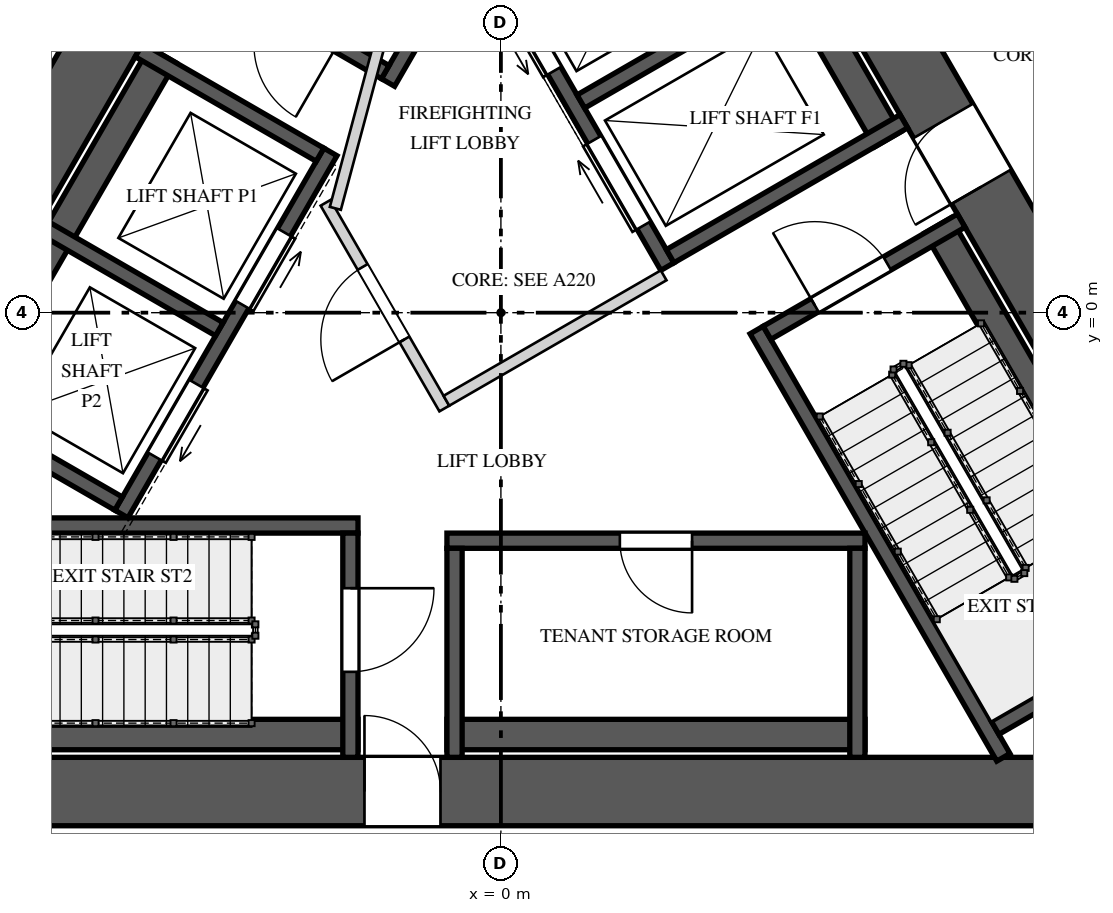
"""IFC4 building model, lengths in metres.
Left out: names, types, materials, properties, quantities, classifications, styles, units other than length and angle.
Written with IfcOpenShell. Run it as: python <this file> out.ifc"""

import sys

from ifc_helpers import new_model, si_unit, direction, frame, frame_2d, origin, place, context, subcontext, project, spatial, rectangle, extrude, element, fill, save


model = new_model("IFC4")
c1 = context("Model", 3, precision=1e-05, world=origin(), true_north=direction((0.0, 1.0)))
c2 = subcontext(c1, "Body", "Model", "MODEL_VIEW")
j1 = project(units=[si_unit("LENGTHUNIT", "METRE"), si_unit("PLANEANGLEUNIT", "RADIAN")], contexts=[c1])
p1 = place(None, origin())
s1 = spatial("IfcSite", under=j1, at=p1, CompositionType="ELEMENT")
p2 = place(p1, origin())
s2 = spatial("IfcBuilding", under=s1, at=p2, CompositionType="ELEMENT")
p3 = place(p2, frame((0.0, 0.0, 133.6)))
s3 = spatial("IfcBuildingStorey", under=s2, at=p3, CompositionType="ELEMENT", Elevation=133.6)
p4 = place(p3, frame((-1.184, 10.55, 0.0), z_axis=(0.0, 0.0, 1.0), x_axis=(-0.500004814304, -0.866022624227, 0.0)))
e1 = element("IfcWall", 1, at=p4, inside=s3, PredefinedType="SHEAR", context=c2, shape_type="SweptSolid", body=[
    extrude(rectangle(XDim=17.09, YDim=0.9, at=frame_2d((8.545, 0.0))), origin(), (0.0, 0.0, 1.0), 4.0),
])
p5 = place(p4, frame((6.75, 0.0, 0.0)))
e2 = element("IfcOpeningElement", 2, at=p5, cuts=e1, PredefinedType="OPENING", context=c2, shape_type="SweptSolid", body=[
    extrude(rectangle(XDim=1.0, YDim=2.4, at=frame_2d((0.5, 1.2))), frame((0.0, 0.46, 0.0), z_axis=(0.0, -1.0, 0.0), x_axis=(1.0, 0.0, 0.0)), (0.0, 0.0, 1.0), 0.92),
])
p6 = place(p4, frame((14.678, 0.0, 0.0)))
e3 = element("IfcOpeningElement", 3, at=p6, cuts=e1, PredefinedType="OPENING", context=c2, shape_type="SweptSolid", body=[
    extrude(rectangle(XDim=0.8, YDim=2.1, at=frame_2d((0.4, 1.05))), frame((0.0, 0.46, 0.0), z_axis=(0.0, -1.0, 0.0), x_axis=(1.0, 0.0, 0.0)), (0.0, 0.0, 1.0), 0.92),
])
p7 = place(p3, frame((-8.545, -6.3, 0.0), z_axis=(0.0, 0.0, 1.0), x_axis=(1.0, 0.0, 0.0)))
e4 = element("IfcWall", 4, at=p7, inside=s3, PredefinedType="SHEAR", context=c2, shape_type="SweptSolid", body=[
    extrude(rectangle(XDim=17.09, YDim=0.9, at=frame_2d((8.545, 0.0))), origin(), (0.0, 0.0, 1.0), 4.0),
])
p8 = place(p7, frame((6.75, 0.0, 0.0)))
e5 = element("IfcOpeningElement", 5, at=p8, cuts=e4, PredefinedType="OPENING", context=c2, shape_type="SweptSolid", body=[
    extrude(rectangle(XDim=1.0, YDim=2.4, at=frame_2d((0.5, 1.2))), frame((0.0, 0.46, 0.0), z_axis=(0.0, -1.0, 0.0), x_axis=(1.0, 0.0, 0.0)), (0.0, 0.0, 1.0), 0.92),
])
p9 = place(p3, frame((9.729, -4.25, 0.0), z_axis=(0.0, 0.0, 1.0), x_axis=(-0.500004814304, 0.866022624227, 0.0)))
e6 = element("IfcWall", 6, at=p9, inside=s3, PredefinedType="SHEAR", context=c2, shape_type="SweptSolid", body=[
    extrude(rectangle(XDim=17.09, YDim=0.9, at=frame_2d((8.545, 0.0))), origin(), (0.0, 0.0, 1.0), 4.0),
])
p10 = place(p9, frame((6.82, 0.0, 0.0)))
e7 = element("IfcOpeningElement", 7, at=p10, cuts=e6, PredefinedType="OPENING", context=c2, shape_type="SweptSolid", body=[
    extrude(rectangle(XDim=1.0, YDim=2.4, at=frame_2d((0.5, 1.2))), frame((0.0, 0.46, 0.0), z_axis=(0.0, -1.0, 0.0), x_axis=(1.0, 0.0, 0.0)), (0.0, 0.0, 1.0), 0.92),
])
p11 = place(p3, frame((1.761, 8.65, 0.0), z_axis=(0.0, 0.0, 1.0), x_axis=(-0.500010023241, -0.866019616786, 0.0)))
e8 = element("IfcWall", 8, at=p11, inside=s3, PredefinedType="SOLIDWALL", context=c2, shape_type="SweptSolid", body=[
    extrude(rectangle(XDim=6.491, YDim=0.2, at=frame_2d((3.246, 0.0))), origin(), (0.0, 0.0, 1.0), 3.65),
])
p12 = place(p3, frame((-1.521, 3.165, 0.0), z_axis=(0.0, 0.0, 1.0), x_axis=(-0.866039495442, 0.49997559174, 0.0)))
e9 = element("IfcWall", 9, at=p12, inside=s3, PredefinedType="SOLIDWALL", context=c2, shape_type="SweptSolid", body=[
    extrude(rectangle(XDim=2.95, YDim=0.2, at=frame_2d((1.475, 0.0))), origin(), (0.0, 0.0, 1.0), 3.65),
])
p13 = place(p12, frame((0.725, 0.0, 0.0)))
e10 = element("IfcOpeningElement", 10, at=p13, cuts=e9, PredefinedType="OPENING", context=c2, shape_type="SweptSolid", body=[
    extrude(rectangle(XDim=1.1, YDim=2.4, at=frame_2d((0.55, 1.2))), frame((0.0, 0.11, 0.0), z_axis=(0.0, -1.0, 0.0), x_axis=(1.0, 0.0, 0.0)), (0.0, 0.0, 1.0), 0.22),
])
p14 = place(p3, frame((-8.08, -5.55, 0.0), z_axis=(0.0, 0.0, 1.0), x_axis=(1.0, 0.0, 0.0)))
e11 = element("IfcWall", 11, at=p14, inside=s3, PredefinedType="SOLIDWALL", context=c2, shape_type="SweptSolid", body=[
    extrude(rectangle(XDim=6.2, YDim=0.4, at=frame_2d((3.1, 0.0))), origin(), (0.0, 0.0, 1.0), 3.65),
])
p15 = place(p3, frame((-8.372, -2.8, 0.0), z_axis=(0.0, 0.0, 1.0), x_axis=(1.0, 0.0, 0.0)))
e12 = element("IfcWall", 12, at=p15, inside=s3, PredefinedType="SOLIDWALL", context=c2, shape_type="SweptSolid", body=[
    extrude(rectangle(XDim=6.492, YDim=0.2, at=frame_2d((3.246, 0.0))), origin(), (0.0, 0.0, 1.0), 3.65),
])
p16 = place(p3, frame((-1.98, -2.9, 0.0), z_axis=(0.0, 0.0, 1.0), x_axis=(0.0, -1.0, 0.0)))
e13 = element("IfcWall", 13, at=p16, inside=s3, PredefinedType="SOLIDWALL", context=c2, shape_type="SweptSolid", body=[
    extrude(rectangle(XDim=2.95, YDim=0.2, at=frame_2d((1.475, 0.0))), origin(), (0.0, 0.0, 1.0), 3.65),
])
p17 = place(p16, frame((0.725, 0.0, 0.0)))
e14 = element("IfcOpeningElement", 14, at=p17, cuts=e13, PredefinedType="OPENING", context=c2, shape_type="SweptSolid", body=[
    extrude(rectangle(XDim=1.1, YDim=2.4, at=frame_2d((0.55, 1.2))), frame((0.0, 0.11, 0.0), z_axis=(0.0, -1.0, 0.0), x_axis=(1.0, 0.0, 0.0)), (0.0, 0.0, 1.0), 0.22),
])
p18 = place(p3, frame((8.846, -4.222, 0.0), z_axis=(0.0, 0.0, 1.0), x_axis=(-0.500009909098, 0.866019682689, 0.0)))
e15 = element("IfcWall", 15, at=p18, inside=s3, PredefinedType="SOLIDWALL", context=c2, shape_type="SweptSolid", body=[
    extrude(rectangle(XDim=6.2, YDim=0.4, at=frame_2d((3.1, 0.0))), origin(), (0.0, 0.0, 1.0), 3.65),
])
p19 = place(p3, frame((6.611, -5.85, 0.0), z_axis=(0.0, 0.0, 1.0), x_axis=(-0.499965531574, 0.866045303225, 0.0)))
e16 = element("IfcWall", 16, at=p19, inside=s3, PredefinedType="SOLIDWALL", context=c2, shape_type="SweptSolid", body=[
    extrude(rectangle(XDim=6.492, YDim=0.2, at=frame_2d((3.246, 0.0))), origin(), (0.0, 0.0, 1.0), 3.65),
])
p20 = place(p3, frame((6.501, -5.461, 0.0), z_axis=(0.0, 0.0, 1.0), x_axis=(0.866003658127, 0.500037662692, 0.0)))
e17 = element("IfcWall", 17, at=p20, inside=s3, PredefinedType="SOLIDWALL", context=c2, shape_type="SweptSolid", body=[
    extrude(rectangle(XDim=2.95, YDim=0.2, at=frame_2d((1.475, 0.0))), origin(), (0.0, 0.0, 1.0), 3.65),
])
p21 = place(p3, frame((3.501, -0.265, 0.0), z_axis=(0.0, 0.0, 1.0), x_axis=(0.866039495442, 0.49997559174, 0.0)))
e18 = element("IfcWall", 18, at=p21, inside=s3, PredefinedType="SOLIDWALL", context=c2, shape_type="SweptSolid", body=[
    extrude(rectangle(XDim=2.95, YDim=0.2, at=frame_2d((1.475, 0.0))), origin(), (0.0, 0.0, 1.0), 3.65),
])
p22 = place(p21, frame((0.725, 0.0, 0.0)))
e19 = element("IfcOpeningElement", 19, at=p22, cuts=e18, PredefinedType="OPENING", context=c2, shape_type="SweptSolid", body=[
    extrude(rectangle(XDim=1.1, YDim=2.4, at=frame_2d((0.55, 1.2))), frame((0.0, 0.11, 0.0), z_axis=(0.0, -1.0, 0.0), x_axis=(1.0, 0.0, 0.0)), (0.0, 0.0, 1.0), 0.22),
])
p23 = place(p3, frame((-2.243, 2.115, 0.0), z_axis=(0.0, 0.0, 1.0), x_axis=(-0.499996545922, -0.866027397988, 0.0)))
e20 = element("IfcWall", 20, at=p23, inside=s3, PredefinedType="SOLIDWALL", context=c2, shape_type="SweptSolid", body=[
    extrude(rectangle(XDim=5.5, YDim=0.2, at=frame_2d((2.75, 0.0))), origin(), (0.0, 0.0, 1.0), 3.65),
])
p24 = place(p23, frame((1.22, 0.0, 0.0)))
e21 = element("IfcOpeningElement", 21, at=p24, cuts=e20, PredefinedType="OPENING", context=c2, shape_type="SweptSolid", body=[
    extrude(rectangle(XDim=1.1, YDim=2.1, at=frame_2d((0.55, 1.05))), frame((0.0, 0.11, 0.0), z_axis=(0.0, -1.0, 0.0), x_axis=(1.0, 0.0, 0.0)), (0.0, 0.0, 1.0), 0.22),
])
p25 = place(p23, frame((3.525, 0.0, 0.0)))
e22 = element("IfcOpeningElement", 22, at=p25, cuts=e20, PredefinedType="OPENING", context=c2, shape_type="SweptSolid", body=[
    extrude(rectangle(XDim=1.1, YDim=2.1, at=frame_2d((0.55, 1.05))), frame((0.0, 0.11, 0.0), z_axis=(0.0, -1.0, 0.0), x_axis=(1.0, 0.0, 0.0)), (0.0, 0.0, 1.0), 0.22),
])
p26 = place(p3, frame((-4.451, 3.39, 0.0), z_axis=(0.0, 0.0, 1.0), x_axis=(-0.499996545922, -0.866027397988, 0.0)))
e23 = element("IfcWall", 23, at=p26, inside=s3, PredefinedType="SOLIDWALL", context=c2, shape_type="SweptSolid", body=[
    extrude(rectangle(XDim=5.5, YDim=0.4, at=frame_2d((2.75, 0.0))), origin(), (0.0, 0.0, 1.0), 3.65),
])
for number, where, z_axis, x_axis in (
    (24, (-2.38, 2.078, 0.0), (0.0, 0.0, 1.0), (-0.866, 0.5, 0.0)),
    (25, (-3.705, -0.217, 0.0), (0.0, 0.0, 1.0), (-0.866, 0.5, 0.0)),
):
    element("IfcWall", number, at=place(p3, frame(where, z_axis=z_axis, x_axis=x_axis)), inside=s3, PredefinedType="SOLIDWALL", context=c2, shape_type="SweptSolid", body=[
        extrude(rectangle(XDim=2.75, YDim=0.2, at=frame_2d((1.375, 0.0))), origin(), (0.0, 0.0, 1.0), 3.65),
    ])
p27 = place(p3, frame((-5.03, -2.512, 0.0), z_axis=(0.0, 0.0, 1.0), x_axis=(-0.866005201286, 0.500034990121, 0.0)))
e26 = element("IfcWall", 26, at=p27, inside=s3, PredefinedType="SOLIDWALL", context=c2, shape_type="SweptSolid", body=[
    extrude(rectangle(XDim=2.75, YDim=0.2, at=frame_2d((1.375, 0.0))), origin(), (0.0, 0.0, 1.0), 3.65),
])
p28 = place(p3, frame((4.79, -3.0, 0.0), z_axis=(0.0, 0.0, 1.0), x_axis=(-1.0, 0.0, 0.0)))
e27 = element("IfcWall", 27, at=p28, inside=s3, PredefinedType="SOLIDWALL", context=c2, shape_type="SweptSolid", body=[
    extrude(rectangle(XDim=5.5, YDim=0.2, at=frame_2d((2.75, 0.0))), origin(), (0.0, 0.0, 1.0), 3.65),
])
p29 = place(p28, frame((2.275, 0.0, 0.0)))
e28 = element("IfcOpeningElement", 28, at=p29, cuts=e27, PredefinedType="OPENING", context=c2, shape_type="SweptSolid", body=[
    extrude(rectangle(XDim=0.95, YDim=2.4, at=frame_2d((0.475, 1.2))), frame((0.0, 0.11, 0.0), z_axis=(0.0, -1.0, 0.0), x_axis=(1.0, 0.0, 0.0)), (0.0, 0.0, 1.0), 0.22),
])
p30 = place(p3, frame((-0.71, -5.55, 0.0), z_axis=(0.0, 0.0, 1.0), x_axis=(1.0, 0.0, 0.0)))
e29 = element("IfcWall", 29, at=p30, inside=s3, PredefinedType="SOLIDWALL", context=c2, shape_type="SweptSolid", body=[
    extrude(rectangle(XDim=5.5, YDim=0.4, at=frame_2d((2.75, 0.0))), origin(), (0.0, 0.0, 1.0), 3.65),
])
for number, where, z_axis, x_axis in (
    (30, (-0.61, -3.1, 0.0), (0.0, 0.0, 1.0), (0.0, -1.0, 0.0)),
    (31, (4.69, -3.1, 0.0), (0.0, 0.0, 1.0), (0.0, -1.0, 0.0)),
):
    element("IfcWall", number, at=place(p3, frame(where, z_axis=z_axis, x_axis=x_axis)), inside=s3, PredefinedType="SOLIDWALL", context=c2, shape_type="SweptSolid", body=[
        extrude(rectangle(XDim=2.75, YDim=0.2, at=frame_2d((1.375, 0.0))), origin(), (0.0, 0.0, 1.0), 3.65),
    ])
p31 = place(p3, frame((2.19, 0.606, 0.0), z_axis=(0.0, 0.0, 1.0), x_axis=(-0.500002801628, 0.866023786258, 0.0)))
e32 = element("IfcWall", 32, at=p31, inside=s3, PredefinedType="SOLIDWALL", context=c2, shape_type="SweptSolid", body=[
    extrude(rectangle(XDim=4.9, YDim=0.2, at=frame_2d((2.45, 0.0))), origin(), (0.0, 0.0, 1.0), 3.65),
])
p32 = place(p31, frame((0.625, 0.0, 0.0)))
e33 = element("IfcOpeningElement", 33, at=p32, cuts=e32, PredefinedType="OPENING", context=c2, shape_type="SweptSolid", body=[
    extrude(rectangle(XDim=1.3, YDim=2.1, at=frame_2d((0.65, 1.05))), frame((0.0, 0.11, 0.0), z_axis=(0.0, -1.0, 0.0), x_axis=(1.0, 0.0, 0.0)), (0.0, 0.0, 1.0), 0.22),
])
p33 = place(p31, frame((2.975, 0.0, 0.0)))
e34 = element("IfcOpeningElement", 34, at=p33, cuts=e32, PredefinedType="OPENING", context=c2, shape_type="SweptSolid", body=[
    extrude(rectangle(XDim=1.3, YDim=2.1, at=frame_2d((0.65, 1.05))), frame((0.0, 0.11, 0.0), z_axis=(0.0, -1.0, 0.0), x_axis=(1.0, 0.0, 0.0)), (0.0, 0.0, 1.0), 0.22),
])
p34 = place(p3, frame((5.092, 2.281, 0.0), z_axis=(0.0, 0.0, 1.0), x_axis=(-0.500018594424, 0.866014668023, 0.0)))
e35 = element("IfcWall", 35, at=p34, inside=s3, PredefinedType="SOLIDWALL", context=c2, shape_type="SweptSolid", body=[
    extrude(rectangle(XDim=4.9, YDim=0.4, at=frame_2d((2.45, 0.0))), origin(), (0.0, 0.0, 1.0), 3.65),
])
for number, where, z_axis, x_axis in (
    (36, (2.227, 0.743, 0.0), (0.0, 0.0, 1.0), (0.866, 0.5, 0.0)),
    (37, (1.052, 2.778, 0.0), (0.0, 0.0, 1.0), (0.866, 0.5, 0.0)),
):
    element("IfcWall", number, at=place(p3, frame(where, z_axis=z_axis, x_axis=x_axis)), inside=s3, PredefinedType="SOLIDWALL", context=c2, shape_type="SweptSolid", body=[
        extrude(rectangle(XDim=3.55, YDim=0.2, at=frame_2d((1.775, 0.0))), origin(), (0.0, 0.0, 1.0), 3.65),
    ])
p35 = place(p3, frame((-0.744, -1.261, 0.0), z_axis=(0.0, 0.0, 1.0), x_axis=(-0.500004234368, 0.866022959057, 0.0)))
e38 = element("IfcWall", 38, at=p35, inside=s3, PredefinedType="PARTITIONING", context=c2, shape_type="SweptSolid", body=[
    extrude(rectangle(XDim=3.125, YDim=0.15, at=frame_2d((1.562, 0.0))), origin(), (0.0, 0.0, 1.0), 3.65),
])
p36 = place(p35, frame((1.05, 0.0, 0.0)))
e39 = element("IfcOpeningElement", 39, at=p36, cuts=e38, PredefinedType="OPENING", context=c2, shape_type="SweptSolid", body=[
    extrude(rectangle(XDim=1.1, YDim=2.4, at=frame_2d((0.55, 1.2))), frame((0.0, 0.085, 0.0), z_axis=(0.0, -1.0, 0.0), x_axis=(1.0, 0.0, 0.0)), (0.0, 0.0, 1.0), 0.17),
])
p37 = place(p3, frame((-0.717, -1.159, 0.0), z_axis=(0.0, 0.0, 1.0), x_axis=(0.866008176907, 0.50002983664, 0.0)))
e40 = element("IfcWall", 40, at=p37, inside=s3, PredefinedType="PARTITIONING", context=c2, shape_type="SweptSolid", body=[
    extrude(rectangle(XDim=3.3, YDim=0.15, at=frame_2d((1.65, 0.0))), origin(), (0.0, 0.0, 1.0), 3.65),
])
p38 = place(p3, frame((-2.178, 1.372, 0.0), z_axis=(0.0, 0.0, 1.0), x_axis=(0.258808958833, 0.96592852884, 0.0)))
e41 = element("IfcWall", 41, at=p38, inside=s3, PredefinedType="PARTITIONING", context=c2, shape_type="SweptSolid", body=[
    extrude(rectangle(XDim=2.903, YDim=0.15, at=frame_2d((1.451, 0.0))), origin(), (0.0, 0.0, 1.0), 3.65),
])
p39 = place(p17, origin())
e42 = element("IfcDoor", 42, at=p39, inside=s3, OperationType="SINGLE_SWING_LEFT", PredefinedType="DOOR", context=c2, shape_type="SweptSolid", body=[
    extrude(rectangle(XDim=1.1, YDim=2.4, at=frame_2d((0.55, 1.2))), frame((0.0, 0.025, 0.0), z_axis=(0.0, -1.0, 0.0), x_axis=(1.0, 0.0, 0.0)), (0.0, 0.0, 1.0), 0.05),
])
fill(e14, e42)
p40 = place(p22, origin())
e43 = element("IfcDoor", 43, at=p40, inside=s3, OperationType="SINGLE_SWING_RIGHT", PredefinedType="DOOR", context=c2, shape_type="SweptSolid", body=[
    extrude(rectangle(XDim=1.1, YDim=2.4, at=frame_2d((0.55, 1.2))), frame((0.0, 0.025, 0.0), z_axis=(0.0, -1.0, 0.0), x_axis=(1.0, 0.0, 0.0)), (0.0, 0.0, 1.0), 0.05),
])
fill(e19, e43)
p41 = place(p24, origin())
e44 = element("IfcDoor", 44, at=p41, inside=s3, OperationType="SLIDING_TO_LEFT", PredefinedType="DOOR", context=c2, shape_type="SweptSolid", body=[
    extrude(rectangle(XDim=1.1, YDim=2.1, at=frame_2d((0.55, 1.05))), frame((0.0, 0.025, 0.0), z_axis=(0.0, -1.0, 0.0), x_axis=(1.0, 0.0, 0.0)), (0.0, 0.0, 1.0), 0.05),
])
fill(e21, e44)
p42 = place(p25, origin())
e45 = element("IfcDoor", 45, at=p42, inside=s3, OperationType="SLIDING_TO_RIGHT", PredefinedType="DOOR", context=c2, shape_type="SweptSolid", body=[
    extrude(rectangle(XDim=1.1, YDim=2.1, at=frame_2d((0.55, 1.05))), frame((0.0, 0.025, 0.0), z_axis=(0.0, -1.0, 0.0), x_axis=(1.0, 0.0, 0.0)), (0.0, 0.0, 1.0), 0.05),
])
fill(e22, e45)
p43 = place(p29, origin())
e46 = element("IfcDoor", 46, at=p43, inside=s3, OperationType="SINGLE_SWING_LEFT", PredefinedType="DOOR", context=c2, shape_type="SweptSolid", body=[
    extrude(rectangle(XDim=0.95, YDim=2.4, at=frame_2d((0.475, 1.2))), frame((0.0, 0.025, 0.0), z_axis=(0.0, -1.0, 0.0), x_axis=(1.0, 0.0, 0.0)), (0.0, 0.0, 1.0), 0.05),
])
fill(e28, e46)
p44 = place(p32, origin())
e47 = element("IfcDoor", 47, at=p44, inside=s3, OperationType="SLIDING_TO_RIGHT", PredefinedType="DOOR", context=c2, shape_type="SweptSolid", body=[
    extrude(rectangle(XDim=1.3, YDim=2.1, at=frame_2d((0.65, 1.05))), frame((0.0, 0.025, 0.0), z_axis=(0.0, -1.0, 0.0), x_axis=(1.0, 0.0, 0.0)), (0.0, 0.0, 1.0), 0.05),
])
fill(e33, e47)
p45 = place(p33, origin())
e48 = element("IfcDoor", 48, at=p45, inside=s3, OperationType="SLIDING_TO_LEFT", PredefinedType="DOOR", context=c2, shape_type="SweptSolid", body=[
    extrude(rectangle(XDim=1.3, YDim=2.1, at=frame_2d((0.65, 1.05))), frame((0.0, 0.025, 0.0), z_axis=(0.0, -1.0, 0.0), x_axis=(1.0, 0.0, 0.0)), (0.0, 0.0, 1.0), 0.05),
])
fill(e34, e48)
p46 = place(p36, origin())
e49 = element("IfcDoor", 49, at=p46, inside=s3, OperationType="SINGLE_SWING_RIGHT", PredefinedType="DOOR", context=c2, shape_type="SweptSolid", body=[
    extrude(rectangle(XDim=1.1, YDim=2.4, at=frame_2d((0.55, 1.2))), frame((0.0, 0.025, 0.0), z_axis=(0.0, -1.0, 0.0), x_axis=(1.0, 0.0, 0.0)), (0.0, 0.0, 1.0), 0.05),
])
fill(e39, e49)
p47 = place(p8, origin())
e50 = element("IfcDoor", 50, at=p47, inside=s3, OperationType="SINGLE_SWING_RIGHT", PredefinedType="DOOR", context=c2, shape_type="SweptSolid", body=[
    extrude(rectangle(XDim=1.0, YDim=2.4, at=frame_2d((0.5, 1.2))), frame((0.0, 0.025, 0.0), z_axis=(0.0, -1.0, 0.0), x_axis=(1.0, 0.0, 0.0)), (0.0, 0.0, 1.0), 0.05),
])
fill(e5, e50)
p48 = place(p10, origin())
e51 = element("IfcDoor", 51, at=p48, inside=s3, OperationType="SINGLE_SWING_LEFT", PredefinedType="DOOR", context=c2, shape_type="SweptSolid", body=[
    extrude(rectangle(XDim=1.0, YDim=2.4, at=frame_2d((0.5, 1.2))), frame((0.0, 0.025, 0.0), z_axis=(0.0, -1.0, 0.0), x_axis=(1.0, 0.0, 0.0)), (0.0, 0.0, 1.0), 0.05),
])
fill(e7, e51)
save(model, sys.argv[1])
